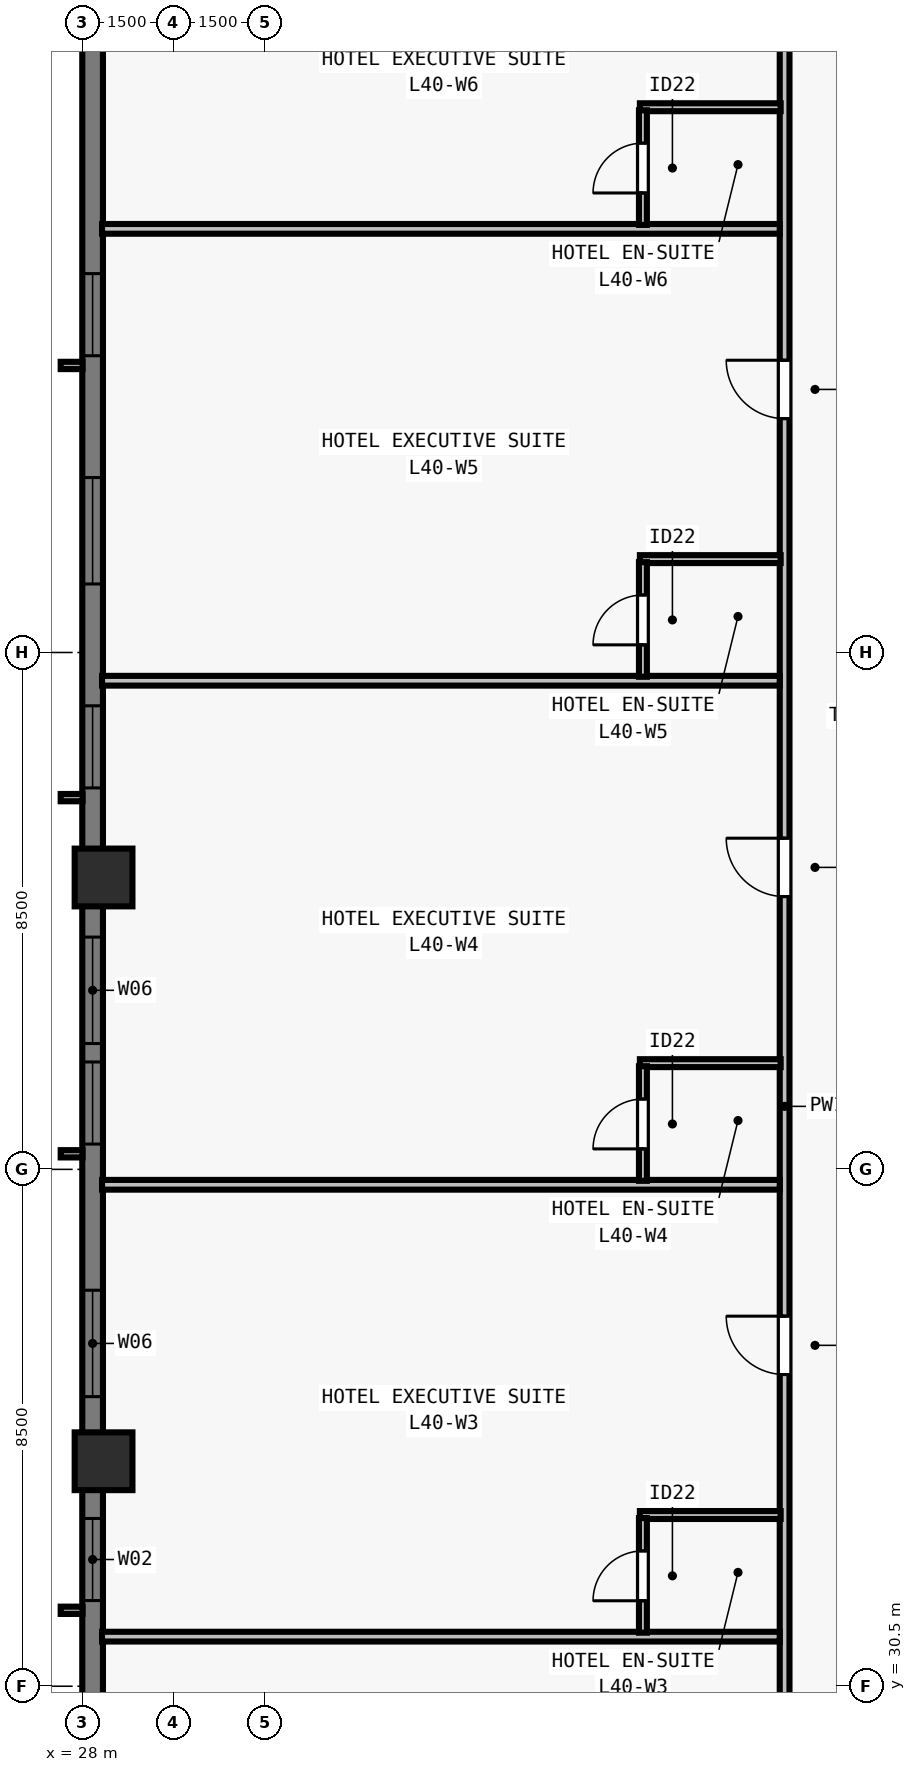
"""IFC4 building model, lengths in metres.
Left out: names, types, materials, properties, quantities, classifications, styles, units other than length and angle.
Written with IfcOpenShell. Run it as: python <this file> out.ifc"""

import sys

from ifc_helpers import new_model, si_unit, direction, frame, frame_2d, origin, origin_2d, place, context, subcontext, project, spatial, rectangle, extrude, element, fill, save


model = new_model("IFC4")
c1 = context("Model", 3, precision=1e-05, world=origin(), true_north=direction((0.0, 1.0)))
c2 = subcontext(c1, "Body", "Model", "MODEL_VIEW")
j1 = project(units=[si_unit("LENGTHUNIT", "METRE"), si_unit("PLANEANGLEUNIT", "RADIAN")], contexts=[c1])
p1 = place(None, origin())
s1 = spatial("IfcSite", under=j1, at=p1, CompositionType="ELEMENT")
p2 = place(p1, origin())
s2 = spatial("IfcBuilding", under=s1, at=p2, CompositionType="ELEMENT")
p3 = place(p2, frame((0.0, 0.0, 148.0)))
s3 = spatial("IfcBuildingStorey", under=s2, at=p3, CompositionType="ELEMENT", Elevation=148.0)
for number, where, z_axis, x_axis in (
    (1, (28.35, 43.8, 0.0), (0.0, 0.0, 1.0), (0.0, 1.0, 0.0)),
    (2, (28.35, 34.2, 0.0), (0.0, 0.0, 1.0), (0.0, 1.0, 0.0)),
):
    element("IfcColumn", number, at=place(p3, frame(where, z_axis=z_axis, x_axis=x_axis)), inside=s3, PredefinedType="COLUMN", context=c2, shape_type="SweptSolid", body=[
        extrude(rectangle(XDim=0.95, YDim=0.95, at=origin_2d()), origin(), (0.0, 0.0, 1.0), 3.5),
    ])
p4 = place(p3, frame((28.17, 19.0, 0.0), z_axis=(0.0, 0.0, 1.0), x_axis=(0.0, 1.0, 0.0)))
e3 = element("IfcWall", 3, at=p4, inside=s3, PredefinedType="SOLIDWALL", context=c2, shape_type="SweptSolid", body=[
    extrude(rectangle(XDim=39.682, YDim=0.34, at=frame_2d((19.841, 0.0))), origin(), (0.0, 0.0, 1.0), 3.28),
])
p5 = place(p4, frame((4.952, 0.0, 0.8)))
e4 = element("IfcOpeningElement", 4, at=p5, cuts=e3, PredefinedType="OPENING", context=c2, shape_type="SweptSolid", body=[
    extrude(rectangle(XDim=1.35, YDim=1.66, at=frame_2d((0.675, 0.83))), frame((0.0, 0.18, 0.0), z_axis=(0.0, -1.0, 0.0), x_axis=(1.0, 0.0, 0.0)), (0.0, 0.0, 1.0), 0.36),
])
p6 = place(p4, frame((8.305, 0.0, 0.8)))
e5 = element("IfcOpeningElement", 5, at=p6, cuts=e3, PredefinedType="OPENING", context=c2, shape_type="SweptSolid", body=[
    extrude(rectangle(XDim=1.75, YDim=1.66, at=frame_2d((0.875, 0.83))), frame((0.0, 0.18, 0.0), z_axis=(0.0, -1.0, 0.0), x_axis=(1.0, 0.0, 0.0)), (0.0, 0.0, 1.0), 0.36),
])
p7 = place(p4, frame((12.909, 0.0, 0.8)))
e6 = element("IfcOpeningElement", 6, at=p7, cuts=e3, PredefinedType="OPENING", context=c2, shape_type="SweptSolid", body=[
    extrude(rectangle(XDim=1.35, YDim=1.66, at=frame_2d((0.675, 0.83))), frame((0.0, 0.18, 0.0), z_axis=(0.0, -1.0, 0.0), x_axis=(1.0, 0.0, 0.0)), (0.0, 0.0, 1.0), 0.36),
])
p8 = place(p4, frame((16.262, 0.0, 0.8)))
e7 = element("IfcOpeningElement", 7, at=p8, cuts=e3, PredefinedType="OPENING", context=c2, shape_type="SweptSolid", body=[
    extrude(rectangle(XDim=1.75, YDim=1.66, at=frame_2d((0.875, 0.83))), frame((0.0, 0.18, 0.0), z_axis=(0.0, -1.0, 0.0), x_axis=(1.0, 0.0, 0.0)), (0.0, 0.0, 1.0), 0.36),
])
p9 = place(p4, frame((20.416, 0.0, 0.8)))
e8 = element("IfcOpeningElement", 8, at=p9, cuts=e3, PredefinedType="OPENING", context=c2, shape_type="SweptSolid", body=[
    extrude(rectangle(XDim=1.35, YDim=1.66, at=frame_2d((0.675, 0.83))), frame((0.0, 0.18, 0.0), z_axis=(0.0, -1.0, 0.0), x_axis=(1.0, 0.0, 0.0)), (0.0, 0.0, 1.0), 0.36),
])
p10 = place(p4, frame((22.07, 0.0, 0.8)))
e9 = element("IfcOpeningElement", 9, at=p10, cuts=e3, PredefinedType="OPENING", context=c2, shape_type="SweptSolid", body=[
    extrude(rectangle(XDim=1.75, YDim=1.66, at=frame_2d((0.875, 0.83))), frame((0.0, 0.18, 0.0), z_axis=(0.0, -1.0, 0.0), x_axis=(1.0, 0.0, 0.0)), (0.0, 0.0, 1.0), 0.36),
])
p11 = place(p4, frame((26.273, 0.0, 0.8)))
e10 = element("IfcOpeningElement", 10, at=p11, cuts=e3, PredefinedType="OPENING", context=c2, shape_type="SweptSolid", body=[
    extrude(rectangle(XDim=1.35, YDim=1.66, at=frame_2d((0.675, 0.83))), frame((0.0, 0.18, 0.0), z_axis=(0.0, -1.0, 0.0), x_axis=(1.0, 0.0, 0.0)), (0.0, 0.0, 1.0), 0.36),
])
p12 = place(p4, frame((29.627, 0.0, 0.8)))
e11 = element("IfcOpeningElement", 11, at=p12, cuts=e3, PredefinedType="OPENING", context=c2, shape_type="SweptSolid", body=[
    extrude(rectangle(XDim=1.75, YDim=1.66, at=frame_2d((0.875, 0.83))), frame((0.0, 0.18, 0.0), z_axis=(0.0, -1.0, 0.0), x_axis=(1.0, 0.0, 0.0)), (0.0, 0.0, 1.0), 0.36),
])
p13 = place(p4, frame((33.38, 0.0, 0.8)))
e12 = element("IfcOpeningElement", 12, at=p13, cuts=e3, PredefinedType="OPENING", context=c2, shape_type="SweptSolid", body=[
    extrude(rectangle(XDim=1.35, YDim=1.66, at=frame_2d((0.675, 0.83))), frame((0.0, 0.18, 0.0), z_axis=(0.0, -1.0, 0.0), x_axis=(1.0, 0.0, 0.0)), (0.0, 0.0, 1.0), 0.36),
])
p14 = place(p3, frame((39.55, 15.325, 0.0), z_axis=(0.0, 0.0, 1.0), x_axis=(0.0, 1.0, 0.0)))
e13 = element("IfcWall", 13, at=p14, inside=s3, PredefinedType="PARTITIONING", context=c2, shape_type="SweptSolid", body=[
    extrude(rectangle(XDim=47.35, YDim=0.16, at=frame_2d((23.675, 0.0))), origin(), (0.0, 0.0, 1.0), 2.555),
])
p15 = place(p14, frame((4.718, 0.0, 0.0)))
e14 = element("IfcOpeningElement", 14, at=p15, cuts=e13, PredefinedType="OPENING", context=c2, shape_type="SweptSolid", body=[
    extrude(rectangle(XDim=0.96, YDim=2.15, at=frame_2d((0.48, 1.075))), frame((0.0, 0.09, 0.0), z_axis=(0.0, -1.0, 0.0), x_axis=(1.0, 0.0, 0.0)), (0.0, 0.0, 1.0), 0.18),
])
p16 = place(p14, frame((12.441, 0.0, 0.0)))
e15 = element("IfcOpeningElement", 15, at=p16, cuts=e13, PredefinedType="OPENING", context=c2, shape_type="SweptSolid", body=[
    extrude(rectangle(XDim=0.96, YDim=2.15, at=frame_2d((0.48, 1.075))), frame((0.0, 0.09, 0.0), z_axis=(0.0, -1.0, 0.0), x_axis=(1.0, 0.0, 0.0)), (0.0, 0.0, 1.0), 0.18),
])
p17 = place(p14, frame((20.301, 0.0, 0.0)))
e16 = element("IfcOpeningElement", 16, at=p17, cuts=e13, PredefinedType="OPENING", context=c2, shape_type="SweptSolid", body=[
    extrude(rectangle(XDim=0.96, YDim=2.15, at=frame_2d((0.48, 1.075))), frame((0.0, 0.09, 0.0), z_axis=(0.0, -1.0, 0.0), x_axis=(1.0, 0.0, 0.0)), (0.0, 0.0, 1.0), 0.18),
])
p18 = place(p14, frame((28.161, 0.0, 0.0)))
e17 = element("IfcOpeningElement", 17, at=p18, cuts=e13, PredefinedType="OPENING", context=c2, shape_type="SweptSolid", body=[
    extrude(rectangle(XDim=0.96, YDim=2.15, at=frame_2d((0.48, 1.075))), frame((0.0, 0.09, 0.0), z_axis=(0.0, -1.0, 0.0), x_axis=(1.0, 0.0, 0.0)), (0.0, 0.0, 1.0), 0.18),
])
p19 = place(p14, frame((36.021, 0.0, 0.0)))
e18 = element("IfcOpeningElement", 18, at=p19, cuts=e13, PredefinedType="OPENING", context=c2, shape_type="SweptSolid", body=[
    extrude(rectangle(XDim=0.96, YDim=2.15, at=frame_2d((0.48, 1.075))), frame((0.0, 0.09, 0.0), z_axis=(0.0, -1.0, 0.0), x_axis=(1.0, 0.0, 0.0)), (0.0, 0.0, 1.0), 0.18),
])
p20 = place(p14, frame((43.793, 0.0, 0.0)))
e19 = element("IfcOpeningElement", 19, at=p20, cuts=e13, PredefinedType="OPENING", context=c2, shape_type="SweptSolid", body=[
    extrude(rectangle(XDim=0.96, YDim=2.15, at=frame_2d((0.48, 1.075))), frame((0.0, 0.09, 0.0), z_axis=(0.0, -1.0, 0.0), x_axis=(1.0, 0.0, 0.0)), (0.0, 0.0, 1.0), 0.18),
])
p21 = place(p3, frame((28.325, 31.315, 0.0), z_axis=(0.0, 0.0, 1.0), x_axis=(1.0, 0.0, 0.0)))
e20 = element("IfcWall", 20, at=p21, inside=s3, PredefinedType="PARTITIONING", context=c2, shape_type="SweptSolid", body=[
    extrude(rectangle(XDim=11.145, YDim=0.16, at=frame_2d((5.573, 0.0))), origin(), (0.0, 0.0, 1.0), 3.28),
])
p22 = place(p3, frame((37.17, 33.315, 0.0), z_axis=(0.0, 0.0, 1.0), x_axis=(1.0, 0.0, 0.0)))
e21 = element("IfcWall", 21, at=p22, inside=s3, PredefinedType="PLUMBINGWALL", context=c2, shape_type="SweptSolid", body=[
    extrude(rectangle(XDim=2.315, YDim=0.13, at=frame_2d((1.158, 0.0))), origin(), (0.0, 0.0, 1.0), 3.28),
])
p23 = place(p3, frame((37.22, 31.381, 0.0), z_axis=(0.0, 0.0, 1.0), x_axis=(0.0, 1.0, 0.0)))
e22 = element("IfcWall", 22, at=p23, inside=s3, PredefinedType="PLUMBINGWALL", context=c2, shape_type="SweptSolid", body=[
    extrude(rectangle(XDim=1.885, YDim=0.13, at=frame_2d((0.942, 0.0))), origin(), (0.0, 0.0, 1.0), 3.28),
])
p24 = place(p23, frame((0.525, 0.0, 0.0)))
e23 = element("IfcOpeningElement", 23, at=p24, cuts=e22, PredefinedType="OPENING", context=c2, shape_type="SweptSolid", body=[
    extrude(rectangle(XDim=0.82, YDim=2.1, at=frame_2d((0.41, 1.05))), frame((0.0, 0.075, 0.0), z_axis=(0.0, -1.0, 0.0), x_axis=(1.0, 0.0, 0.0)), (0.0, 0.0, 1.0), 0.15),
])
p25 = place(p3, frame((28.325, 38.747, 0.0), z_axis=(0.0, 0.0, 1.0), x_axis=(1.0, 0.0, 0.0)))
e24 = element("IfcWall", 24, at=p25, inside=s3, PredefinedType="PARTITIONING", context=c2, shape_type="SweptSolid", body=[
    extrude(rectangle(XDim=11.145, YDim=0.16, at=frame_2d((5.573, 0.0))), origin(), (0.0, 0.0, 1.0), 2.896),
])
p26 = place(p3, frame((37.17, 40.747, 0.0), z_axis=(0.0, 0.0, 1.0), x_axis=(1.0, 0.0, 0.0)))
e25 = element("IfcWall", 25, at=p26, inside=s3, PredefinedType="PLUMBINGWALL", context=c2, shape_type="SweptSolid", body=[
    extrude(rectangle(XDim=2.315, YDim=0.13, at=frame_2d((1.158, 0.0))), origin(), (0.0, 0.0, 1.0), 3.28),
])
p27 = place(p3, frame((37.22, 38.812, 0.0), z_axis=(0.0, 0.0, 1.0), x_axis=(0.0, 1.0, 0.0)))
e26 = element("IfcWall", 26, at=p27, inside=s3, PredefinedType="PLUMBINGWALL", context=c2, shape_type="SweptSolid", body=[
    extrude(rectangle(XDim=1.885, YDim=0.13, at=frame_2d((0.942, 0.0))), origin(), (0.0, 0.0, 1.0), 3.28),
])
p28 = place(p27, frame((0.525, 0.0, 0.0)))
e27 = element("IfcOpeningElement", 27, at=p28, cuts=e26, PredefinedType="OPENING", context=c2, shape_type="SweptSolid", body=[
    extrude(rectangle(XDim=0.82, YDim=2.1, at=frame_2d((0.41, 1.05))), frame((0.0, 0.075, 0.0), z_axis=(0.0, -1.0, 0.0), x_axis=(1.0, 0.0, 0.0)), (0.0, 0.0, 1.0), 0.15),
])
p29 = place(p3, frame((28.325, 47.035, 0.0), z_axis=(0.0, 0.0, 1.0), x_axis=(1.0, 0.0, 0.0)))
e28 = element("IfcWall", 28, at=p29, inside=s3, PredefinedType="PARTITIONING", context=c2, shape_type="SweptSolid", body=[
    extrude(rectangle(XDim=11.145, YDim=0.16, at=frame_2d((5.573, 0.0))), origin(), (0.0, 0.0, 1.0), 3.28),
])
p30 = place(p3, frame((37.17, 49.035, 0.0), z_axis=(0.0, 0.0, 1.0), x_axis=(1.0, 0.0, 0.0)))
e29 = element("IfcWall", 29, at=p30, inside=s3, PredefinedType="PLUMBINGWALL", context=c2, shape_type="SweptSolid", body=[
    extrude(rectangle(XDim=2.315, YDim=0.13, at=frame_2d((1.158, 0.0))), origin(), (0.0, 0.0, 1.0), 3.28),
])
p31 = place(p3, frame((37.22, 47.101, 0.0), z_axis=(0.0, 0.0, 1.0), x_axis=(0.0, 1.0, 0.0)))
e30 = element("IfcWall", 30, at=p31, inside=s3, PredefinedType="PLUMBINGWALL", context=c2, shape_type="SweptSolid", body=[
    extrude(rectangle(XDim=1.885, YDim=0.13, at=frame_2d((0.942, 0.0))), origin(), (0.0, 0.0, 1.0), 3.28),
])
p32 = place(p31, frame((0.525, 0.0, 0.0)))
e31 = element("IfcOpeningElement", 31, at=p32, cuts=e30, PredefinedType="OPENING", context=c2, shape_type="SweptSolid", body=[
    extrude(rectangle(XDim=0.82, YDim=2.1, at=frame_2d((0.41, 1.05))), frame((0.0, 0.075, 0.0), z_axis=(0.0, -1.0, 0.0), x_axis=(1.0, 0.0, 0.0)), (0.0, 0.0, 1.0), 0.15),
])
p33 = place(p3, frame((28.325, 54.467, 0.0), z_axis=(0.0, 0.0, 1.0), x_axis=(1.0, 0.0, 0.0)))
e32 = element("IfcWall", 32, at=p33, inside=s3, PredefinedType="PARTITIONING", context=c2, shape_type="SweptSolid", body=[
    extrude(rectangle(XDim=11.145, YDim=0.16, at=frame_2d((5.573, 0.0))), origin(), (0.0, 0.0, 1.0), 2.896),
])
p34 = place(p3, frame((37.17, 56.467, 0.0), z_axis=(0.0, 0.0, 1.0), x_axis=(1.0, 0.0, 0.0)))
e33 = element("IfcWall", 33, at=p34, inside=s3, PredefinedType="PLUMBINGWALL", context=c2, shape_type="SweptSolid", body=[
    extrude(rectangle(XDim=2.315, YDim=0.13, at=frame_2d((1.158, 0.0))), origin(), (0.0, 0.0, 1.0), 3.28),
])
p35 = place(p3, frame((37.22, 54.531, 0.0), z_axis=(0.0, 0.0, 1.0), x_axis=(0.0, 1.0, 0.0)))
e34 = element("IfcWall", 34, at=p35, inside=s3, PredefinedType="PLUMBINGWALL", context=c2, shape_type="SweptSolid", body=[
    extrude(rectangle(XDim=1.885, YDim=0.13, at=frame_2d((0.942, 0.0))), origin(), (0.0, 0.0, 1.0), 2.555),
])
p36 = place(p35, frame((0.525, 0.0, 0.0)))
e35 = element("IfcOpeningElement", 35, at=p36, cuts=e34, PredefinedType="OPENING", context=c2, shape_type="SweptSolid", body=[
    extrude(rectangle(XDim=0.82, YDim=2.1, at=frame_2d((0.41, 1.05))), frame((0.0, 0.075, 0.0), z_axis=(0.0, -1.0, 0.0), x_axis=(1.0, 0.0, 0.0)), (0.0, 0.0, 1.0), 0.15),
])
p37 = place(p7, origin())
e36 = element("IfcWindow", 36, at=p37, inside=s3, PartitioningType="SINGLE_PANEL", PredefinedType="WINDOW", context=c2, shape_type="SweptSolid", body=[
    extrude(rectangle(XDim=1.35, YDim=1.66, at=frame_2d((0.675, 0.83))), frame((0.0, -0.05, 0.0), z_axis=(0.0, -1.0, 0.0), x_axis=(1.0, 0.0, 0.0)), (0.0, 0.0, 1.0), 0.06),
])
fill(e6, e36)
p38 = place(p8, origin())
e37 = element("IfcWindow", 37, at=p38, inside=s3, PartitioningType="SINGLE_PANEL", PredefinedType="WINDOW", context=c2, shape_type="SweptSolid", body=[
    extrude(rectangle(XDim=1.75, YDim=1.66, at=frame_2d((0.875, 0.83))), frame((0.0, -0.05, 0.0), z_axis=(0.0, -1.0, 0.0), x_axis=(1.0, 0.0, 0.0)), (0.0, 0.0, 1.0), 0.06),
])
fill(e7, e37)
p39 = place(p9, origin())
e38 = element("IfcWindow", 38, at=p39, inside=s3, PartitioningType="SINGLE_PANEL", PredefinedType="WINDOW", context=c2, shape_type="SweptSolid", body=[
    extrude(rectangle(XDim=1.35, YDim=1.66, at=frame_2d((0.675, 0.83))), frame((0.0, -0.05, 0.0), z_axis=(0.0, -1.0, 0.0), x_axis=(1.0, 0.0, 0.0)), (0.0, 0.0, 1.0), 0.06),
])
fill(e8, e38)
p40 = place(p10, origin())
e39 = element("IfcWindow", 39, at=p40, inside=s3, PartitioningType="SINGLE_PANEL", PredefinedType="WINDOW", context=c2, shape_type="SweptSolid", body=[
    extrude(rectangle(XDim=1.75, YDim=1.66, at=frame_2d((0.875, 0.83))), frame((0.0, -0.05, 0.0), z_axis=(0.0, -1.0, 0.0), x_axis=(1.0, 0.0, 0.0)), (0.0, 0.0, 1.0), 0.06),
])
fill(e9, e39)
p41 = place(p11, origin())
e40 = element("IfcWindow", 40, at=p41, inside=s3, PartitioningType="SINGLE_PANEL", PredefinedType="WINDOW", context=c2, shape_type="SweptSolid", body=[
    extrude(rectangle(XDim=1.35, YDim=1.66, at=frame_2d((0.675, 0.83))), frame((0.0, -0.05, 0.0), z_axis=(0.0, -1.0, 0.0), x_axis=(1.0, 0.0, 0.0)), (0.0, 0.0, 1.0), 0.06),
])
fill(e10, e40)
p42 = place(p12, origin())
e41 = element("IfcWindow", 41, at=p42, inside=s3, PartitioningType="SINGLE_PANEL", PredefinedType="WINDOW", context=c2, shape_type="SweptSolid", body=[
    extrude(rectangle(XDim=1.75, YDim=1.66, at=frame_2d((0.875, 0.83))), frame((0.0, -0.05, 0.0), z_axis=(0.0, -1.0, 0.0), x_axis=(1.0, 0.0, 0.0)), (0.0, 0.0, 1.0), 0.06),
])
fill(e11, e41)
p43 = place(p13, origin())
e42 = element("IfcWindow", 42, at=p43, inside=s3, PartitioningType="SINGLE_PANEL", PredefinedType="WINDOW", context=c2, shape_type="SweptSolid", body=[
    extrude(rectangle(XDim=1.35, YDim=1.66, at=frame_2d((0.675, 0.83))), frame((0.0, -0.05, 0.0), z_axis=(0.0, -1.0, 0.0), x_axis=(1.0, 0.0, 0.0)), (0.0, 0.0, 1.0), 0.06),
])
fill(e12, e42)
p44 = place(p24, origin())
e43 = element("IfcDoor", 43, at=p44, inside=s3, OperationType="SINGLE_SWING_LEFT", PredefinedType="DOOR", context=c2, shape_type="SweptSolid", body=[
    extrude(rectangle(XDim=0.82, YDim=2.1, at=frame_2d((0.41, 1.05))), frame((0.0, 0.025, 0.0), z_axis=(0.0, -1.0, 0.0), x_axis=(1.0, 0.0, 0.0)), (0.0, 0.0, 1.0), 0.05),
])
fill(e23, e43)
p45 = place(p17, origin())
e44 = element("IfcDoor", 44, at=p45, inside=s3, OperationType="SINGLE_SWING_RIGHT", PredefinedType="DOOR", context=c2, shape_type="SweptSolid", body=[
    extrude(rectangle(XDim=0.96, YDim=2.15, at=frame_2d((0.48, 1.075))), frame((0.0, 0.025, 0.0), z_axis=(0.0, -1.0, 0.0), x_axis=(1.0, 0.0, 0.0)), (0.0, 0.0, 1.0), 0.05),
])
fill(e16, e44)
p46 = place(p28, origin())
e45 = element("IfcDoor", 45, at=p46, inside=s3, OperationType="SINGLE_SWING_LEFT", PredefinedType="DOOR", context=c2, shape_type="SweptSolid", body=[
    extrude(rectangle(XDim=0.82, YDim=2.1, at=frame_2d((0.41, 1.05))), frame((0.0, 0.025, 0.0), z_axis=(0.0, -1.0, 0.0), x_axis=(1.0, 0.0, 0.0)), (0.0, 0.0, 1.0), 0.05),
])
fill(e27, e45)
p47 = place(p18, origin())
e46 = element("IfcDoor", 46, at=p47, inside=s3, OperationType="SINGLE_SWING_RIGHT", PredefinedType="DOOR", context=c2, shape_type="SweptSolid", body=[
    extrude(rectangle(XDim=0.96, YDim=2.15, at=frame_2d((0.48, 1.075))), frame((0.0, 0.025, 0.0), z_axis=(0.0, -1.0, 0.0), x_axis=(1.0, 0.0, 0.0)), (0.0, 0.0, 1.0), 0.05),
])
fill(e17, e46)
p48 = place(p32, origin())
e47 = element("IfcDoor", 47, at=p48, inside=s3, OperationType="SINGLE_SWING_LEFT", PredefinedType="DOOR", context=c2, shape_type="SweptSolid", body=[
    extrude(rectangle(XDim=0.82, YDim=2.1, at=frame_2d((0.41, 1.05))), frame((0.0, 0.025, 0.0), z_axis=(0.0, -1.0, 0.0), x_axis=(1.0, 0.0, 0.0)), (0.0, 0.0, 1.0), 0.05),
])
fill(e31, e47)
p49 = place(p19, origin())
e48 = element("IfcDoor", 48, at=p49, inside=s3, OperationType="SINGLE_SWING_RIGHT", PredefinedType="DOOR", context=c2, shape_type="SweptSolid", body=[
    extrude(rectangle(XDim=0.96, YDim=2.15, at=frame_2d((0.48, 1.075))), frame((0.0, 0.025, 0.0), z_axis=(0.0, -1.0, 0.0), x_axis=(1.0, 0.0, 0.0)), (0.0, 0.0, 1.0), 0.05),
])
fill(e18, e48)
p50 = place(p36, origin())
e49 = element("IfcDoor", 49, at=p50, inside=s3, OperationType="SINGLE_SWING_LEFT", PredefinedType="DOOR", context=c2, shape_type="SweptSolid", body=[
    extrude(rectangle(XDim=0.82, YDim=2.1, at=frame_2d((0.41, 1.05))), frame((0.0, 0.025, 0.0), z_axis=(0.0, -1.0, 0.0), x_axis=(1.0, 0.0, 0.0)), (0.0, 0.0, 1.0), 0.05),
])
fill(e35, e49)
save(model, sys.argv[1])
